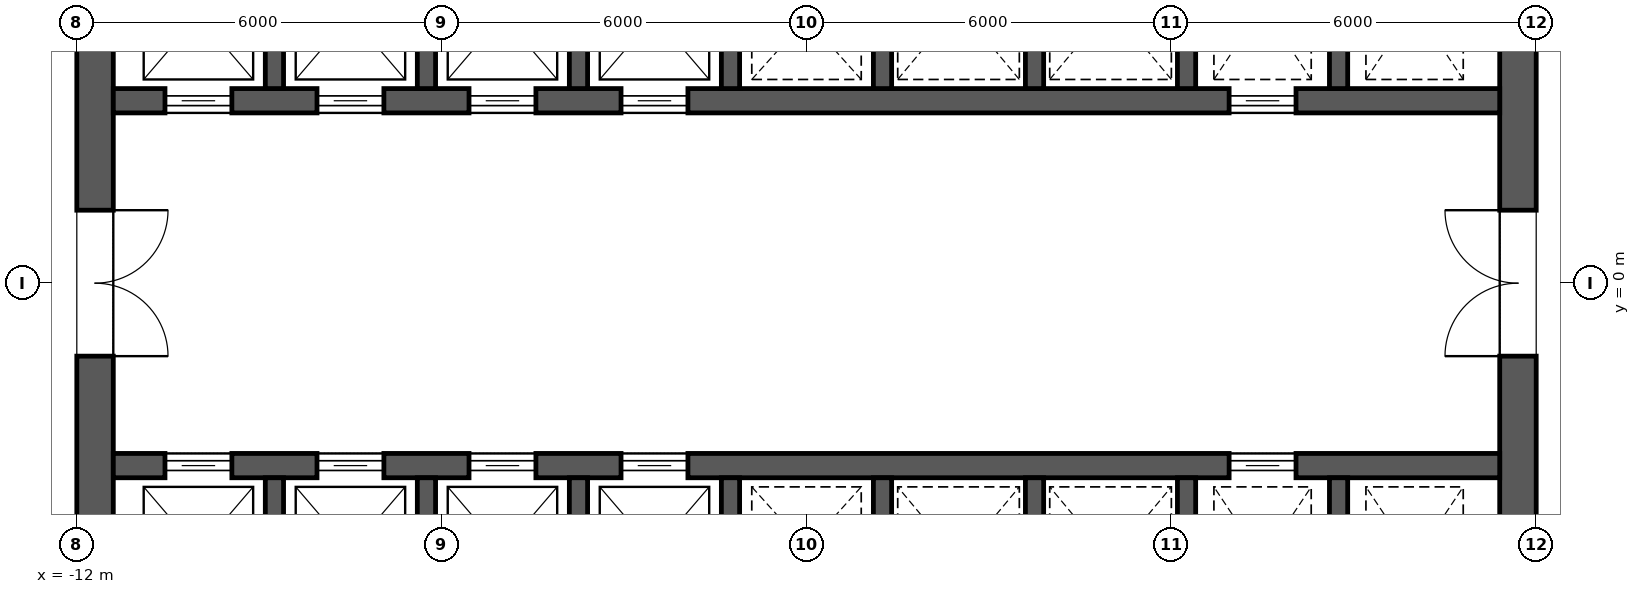
"""IFC4 building model, lengths in metres.
Left out: names, types, materials, properties, quantities, classifications, styles, units other than length and angle.
Written with IfcOpenShell. Run it as: python <this file> out.ifc"""

import sys

from ifc_helpers import new_model, si_unit, direction, frame, frame_2d, origin, place, context, subcontext, project, spatial, rectangle, extrude, element, fill, save


model = new_model("IFC4")
c1 = context("Model", 3, precision=1e-05, world=origin(), true_north=direction((0.0, 1.0)))
c2 = subcontext(c1, "Body", "Model", "MODEL_VIEW")
j1 = project(units=[si_unit("LENGTHUNIT", "METRE"), si_unit("PLANEANGLEUNIT", "RADIAN")], contexts=[c1])
p1 = place(None, origin())
s1 = spatial("IfcSite", under=j1, at=p1, CompositionType="ELEMENT")
p2 = place(p1, origin())
s2 = spatial("IfcBuilding", under=s1, at=p2, CompositionType="ELEMENT")
p3 = place(p2, frame((0.0, 0.0, 69.7)))
s3 = spatial("IfcBuildingStorey", under=s2, at=p3, CompositionType="ELEMENT", Elevation=69.7)
p4 = place(p3, frame((11.7, -11.4, 0.0), z_axis=(0.0, 0.0, 1.0), x_axis=(0.0, 1.0, 0.0)))
e1 = element("IfcWall", 1, at=p4, inside=s3, PredefinedType="SHEAR", context=c2, shape_type="SweptSolid", body=[
    extrude(rectangle(XDim=22.8, YDim=0.6, at=frame_2d((11.4, 0.0))), origin(), (0.0, 0.0, 1.0), 4.2),
])
p5 = place(p4, frame((10.2, 0.0, 0.0)))
e2 = element("IfcOpeningElement", 2, at=p5, cuts=e1, PredefinedType="OPENING", context=c2, shape_type="SweptSolid", body=[
    extrude(rectangle(XDim=2.4, YDim=2.1, at=frame_2d((1.2, 1.05))), frame((0.0, 0.312, 0.0), z_axis=(0.0, -1.0, 0.0), x_axis=(1.0, 0.0, 0.0)), (0.0, 0.0, 1.0), 0.624),
])
p6 = place(p4, frame((19.5, 0.0, 0.0)))
e3 = element("IfcOpeningElement", 3, at=p6, cuts=e1, PredefinedType="OPENING", context=c2, shape_type="SweptSolid", body=[
    extrude(rectangle(XDim=1.2, YDim=2.1, at=frame_2d((0.6, 1.05))), frame((0.0, 0.312, 0.0), z_axis=(0.0, -1.0, 0.0), x_axis=(1.0, 0.0, 0.0)), (0.0, 0.0, 1.0), 0.624),
])
p7 = place(p4, frame((2.1, 0.0, 0.0)))
e4 = element("IfcOpeningElement", 4, at=p7, cuts=e1, PredefinedType="OPENING", context=c2, shape_type="SweptSolid", body=[
    extrude(rectangle(XDim=1.2, YDim=2.1, at=frame_2d((0.6, 1.05))), frame((0.0, 0.312, 0.0), z_axis=(0.0, -1.0, 0.0), x_axis=(1.0, 0.0, 0.0)), (0.0, 0.0, 1.0), 0.624),
])
p8 = place(p3, frame((-11.7, -11.4, 0.0), z_axis=(0.0, 0.0, 1.0), x_axis=(0.0, 1.0, 0.0)))
e5 = element("IfcWall", 5, at=p8, inside=s3, PredefinedType="SHEAR", context=c2, shape_type="SweptSolid", body=[
    extrude(rectangle(XDim=22.8, YDim=0.6, at=frame_2d((11.4, 0.0))), origin(), (0.0, 0.0, 1.0), 4.2),
])
p9 = place(p8, frame((10.2, 0.0, 0.0)))
e6 = element("IfcOpeningElement", 6, at=p9, cuts=e5, PredefinedType="OPENING", context=c2, shape_type="SweptSolid", body=[
    extrude(rectangle(XDim=2.4, YDim=2.1, at=frame_2d((1.2, 1.05))), frame((0.0, 0.312, 0.0), z_axis=(0.0, -1.0, 0.0), x_axis=(1.0, 0.0, 0.0)), (0.0, 0.0, 1.0), 0.624),
])
p10 = place(p8, frame((18.925, 0.0, 0.0)))
e7 = element("IfcOpeningElement", 7, at=p10, cuts=e5, PredefinedType="OPENING", context=c2, shape_type="SweptSolid", body=[
    extrude(rectangle(XDim=1.2, YDim=2.1, at=frame_2d((0.6, 1.05))), frame((0.0, 0.312, 0.0), z_axis=(0.0, -1.0, 0.0), x_axis=(1.0, 0.0, 0.0)), (0.0, 0.0, 1.0), 0.624),
])
p11 = place(p8, frame((2.675, 0.0, 0.0)))
e8 = element("IfcOpeningElement", 8, at=p11, cuts=e5, PredefinedType="OPENING", context=c2, shape_type="SweptSolid", body=[
    extrude(rectangle(XDim=1.2, YDim=2.1, at=frame_2d((0.6, 1.05))), frame((0.0, 0.312, 0.0), z_axis=(0.0, -1.0, 0.0), x_axis=(1.0, 0.0, 0.0)), (0.0, 0.0, 1.0), 0.624),
])
p12 = place(p3, frame((-11.4, 3.0, 0.0), z_axis=(0.0, 0.0, 1.0), x_axis=(1.0, 0.0, 0.0)))
e9 = element("IfcWall", 9, at=p12, inside=s3, PredefinedType="SHEAR", context=c2, shape_type="SweptSolid", body=[
    extrude(rectangle(XDim=22.8, YDim=0.4, at=frame_2d((11.4, 0.0))), origin(), (0.0, 0.0, 1.0), 4.2),
])
p13 = place(p12, frame((0.85, 0.0, 0.0)))
e10 = element("IfcOpeningElement", 10, at=p13, cuts=e9, PredefinedType="OPENING", context=c2, shape_type="SweptSolid", body=[
    extrude(rectangle(XDim=1.1, YDim=2.1, at=frame_2d((0.55, 1.05))), frame((0.0, 0.212, 0.0), z_axis=(0.0, -1.0, 0.0), x_axis=(1.0, 0.0, 0.0)), (0.0, 0.0, 1.0), 0.424),
])
p14 = place(p12, frame((3.35, 0.0, 0.0)))
e11 = element("IfcOpeningElement", 11, at=p14, cuts=e9, PredefinedType="OPENING", context=c2, shape_type="SweptSolid", body=[
    extrude(rectangle(XDim=1.1, YDim=2.1, at=frame_2d((0.55, 1.05))), frame((0.0, 0.212, 0.0), z_axis=(0.0, -1.0, 0.0), x_axis=(1.0, 0.0, 0.0)), (0.0, 0.0, 1.0), 0.424),
])
p15 = place(p12, frame((5.85, 0.0, 0.0)))
e12 = element("IfcOpeningElement", 12, at=p15, cuts=e9, PredefinedType="OPENING", context=c2, shape_type="SweptSolid", body=[
    extrude(rectangle(XDim=1.1, YDim=2.1, at=frame_2d((0.55, 1.05))), frame((0.0, 0.212, 0.0), z_axis=(0.0, -1.0, 0.0), x_axis=(1.0, 0.0, 0.0)), (0.0, 0.0, 1.0), 0.424),
])
p16 = place(p12, frame((8.35, 0.0, 0.0)))
e13 = element("IfcOpeningElement", 13, at=p16, cuts=e9, PredefinedType="OPENING", context=c2, shape_type="SweptSolid", body=[
    extrude(rectangle(XDim=1.1, YDim=2.1, at=frame_2d((0.55, 1.05))), frame((0.0, 0.212, 0.0), z_axis=(0.0, -1.0, 0.0), x_axis=(1.0, 0.0, 0.0)), (0.0, 0.0, 1.0), 0.424),
])
p17 = place(p12, frame((18.35, 0.0, 0.0)))
e14 = element("IfcOpeningElement", 14, at=p17, cuts=e9, PredefinedType="OPENING", context=c2, shape_type="SweptSolid", body=[
    extrude(rectangle(XDim=1.1, YDim=2.1, at=frame_2d((0.55, 1.05))), frame((0.0, 0.212, 0.0), z_axis=(0.0, -1.0, 0.0), x_axis=(1.0, 0.0, 0.0)), (0.0, 0.0, 1.0), 0.424),
])
for number, where, z_axis, x_axis in (
    (15, (-8.75, 3.2, 0.0), (0.0, 0.0, 1.0), (0.0, 1.0, 0.0)),
    (16, (-6.25, 3.2, 0.0), (0.0, 0.0, 1.0), (0.0, 1.0, 0.0)),
    (17, (-3.75, 3.2, 0.0), (0.0, 0.0, 1.0), (0.0, 1.0, 0.0)),
    (18, (-1.25, 3.2, 0.0), (0.0, 0.0, 1.0), (0.0, 1.0, 0.0)),
    (19, (1.25, 3.2, 0.0), (0.0, 0.0, 1.0), (0.0, 1.0, 0.0)),
    (20, (3.75, 3.2, 0.0), (0.0, 0.0, 1.0), (0.0, 1.0, 0.0)),
    (21, (6.25, 3.2, 0.0), (0.0, 0.0, 1.0), (0.0, 1.0, 0.0)),
    (22, (8.75, 3.2, 0.0), (0.0, 0.0, 1.0), (0.0, 1.0, 0.0)),
):
    element("IfcWall", number, at=place(p3, frame(where, z_axis=z_axis, x_axis=x_axis)), inside=s3, PredefinedType="SHEAR", context=c2, shape_type="SweptSolid", body=[
        extrude(rectangle(XDim=2.9, YDim=0.3, at=frame_2d((1.45, 0.0))), origin(), (0.0, 0.0, 1.0), 4.2),
    ])
p18 = place(p3, frame((-11.4, -3.0, 0.0), z_axis=(0.0, 0.0, 1.0), x_axis=(1.0, 0.0, 0.0)))
e23 = element("IfcWall", 23, at=p18, inside=s3, PredefinedType="SHEAR", context=c2, shape_type="SweptSolid", body=[
    extrude(rectangle(XDim=22.8, YDim=0.4, at=frame_2d((11.4, 0.0))), origin(), (0.0, 0.0, 1.0), 4.2),
])
p19 = place(p18, frame((0.85, 0.0, 0.0)))
e24 = element("IfcOpeningElement", 24, at=p19, cuts=e23, PredefinedType="OPENING", context=c2, shape_type="SweptSolid", body=[
    extrude(rectangle(XDim=1.1, YDim=2.1, at=frame_2d((0.55, 1.05))), frame((0.0, 0.212, 0.0), z_axis=(0.0, -1.0, 0.0), x_axis=(1.0, 0.0, 0.0)), (0.0, 0.0, 1.0), 0.424),
])
p20 = place(p18, frame((3.35, 0.0, 0.0)))
e25 = element("IfcOpeningElement", 25, at=p20, cuts=e23, PredefinedType="OPENING", context=c2, shape_type="SweptSolid", body=[
    extrude(rectangle(XDim=1.1, YDim=2.1, at=frame_2d((0.55, 1.05))), frame((0.0, 0.212, 0.0), z_axis=(0.0, -1.0, 0.0), x_axis=(1.0, 0.0, 0.0)), (0.0, 0.0, 1.0), 0.424),
])
p21 = place(p18, frame((5.85, 0.0, 0.0)))
e26 = element("IfcOpeningElement", 26, at=p21, cuts=e23, PredefinedType="OPENING", context=c2, shape_type="SweptSolid", body=[
    extrude(rectangle(XDim=1.1, YDim=2.1, at=frame_2d((0.55, 1.05))), frame((0.0, 0.212, 0.0), z_axis=(0.0, -1.0, 0.0), x_axis=(1.0, 0.0, 0.0)), (0.0, 0.0, 1.0), 0.424),
])
p22 = place(p18, frame((8.35, 0.0, 0.0)))
e27 = element("IfcOpeningElement", 27, at=p22, cuts=e23, PredefinedType="OPENING", context=c2, shape_type="SweptSolid", body=[
    extrude(rectangle(XDim=1.1, YDim=2.1, at=frame_2d((0.55, 1.05))), frame((0.0, 0.212, 0.0), z_axis=(0.0, -1.0, 0.0), x_axis=(1.0, 0.0, 0.0)), (0.0, 0.0, 1.0), 0.424),
])
p23 = place(p18, frame((18.35, 0.0, 0.0)))
e28 = element("IfcOpeningElement", 28, at=p23, cuts=e23, PredefinedType="OPENING", context=c2, shape_type="SweptSolid", body=[
    extrude(rectangle(XDim=1.1, YDim=2.1, at=frame_2d((0.55, 1.05))), frame((0.0, 0.212, 0.0), z_axis=(0.0, -1.0, 0.0), x_axis=(1.0, 0.0, 0.0)), (0.0, 0.0, 1.0), 0.424),
])
for number, where, z_axis, x_axis in (
    (29, (-8.75, -6.1, 0.0), (0.0, 0.0, 1.0), (0.0, 1.0, 0.0)),
    (30, (-6.25, -6.1, 0.0), (0.0, 0.0, 1.0), (0.0, 1.0, 0.0)),
    (31, (-3.75, -6.1, 0.0), (0.0, 0.0, 1.0), (0.0, 1.0, 0.0)),
    (32, (-1.25, -6.1, 0.0), (0.0, 0.0, 1.0), (0.0, 1.0, 0.0)),
    (33, (1.25, -6.1, 0.0), (0.0, 0.0, 1.0), (0.0, 1.0, 0.0)),
    (34, (3.75, -6.1, 0.0), (0.0, 0.0, 1.0), (0.0, 1.0, 0.0)),
    (35, (6.25, -6.1, 0.0), (0.0, 0.0, 1.0), (0.0, 1.0, 0.0)),
    (36, (8.75, -6.1, 0.0), (0.0, 0.0, 1.0), (0.0, 1.0, 0.0)),
):
    element("IfcWall", number, at=place(p3, frame(where, z_axis=z_axis, x_axis=x_axis)), inside=s3, PredefinedType="SHEAR", context=c2, shape_type="SweptSolid", body=[
        extrude(rectangle(XDim=2.9, YDim=0.3, at=frame_2d((1.45, 0.0))), origin(), (0.0, 0.0, 1.0), 4.2),
    ])
p24 = place(p13, origin())
e37 = element("IfcDoor", 37, at=p24, inside=s3, OperationType="SLIDING_TO_LEFT", PredefinedType="DOOR", context=c2, shape_type="SweptSolid", body=[
    extrude(rectangle(XDim=1.1, YDim=2.1, at=frame_2d((0.55, 1.05))), frame((0.0, 0.025, 0.0), z_axis=(0.0, -1.0, 0.0), x_axis=(1.0, 0.0, 0.0)), (0.0, 0.0, 1.0), 0.05),
])
fill(e10, e37)
p25 = place(p14, origin())
e38 = element("IfcDoor", 38, at=p25, inside=s3, OperationType="SLIDING_TO_LEFT", PredefinedType="DOOR", context=c2, shape_type="SweptSolid", body=[
    extrude(rectangle(XDim=1.1, YDim=2.1, at=frame_2d((0.55, 1.05))), frame((0.0, 0.025, 0.0), z_axis=(0.0, -1.0, 0.0), x_axis=(1.0, 0.0, 0.0)), (0.0, 0.0, 1.0), 0.05),
])
fill(e11, e38)
p26 = place(p15, origin())
e39 = element("IfcDoor", 39, at=p26, inside=s3, OperationType="SLIDING_TO_LEFT", PredefinedType="DOOR", context=c2, shape_type="SweptSolid", body=[
    extrude(rectangle(XDim=1.1, YDim=2.1, at=frame_2d((0.55, 1.05))), frame((0.0, 0.025, 0.0), z_axis=(0.0, -1.0, 0.0), x_axis=(1.0, 0.0, 0.0)), (0.0, 0.0, 1.0), 0.05),
])
fill(e12, e39)
p27 = place(p16, origin())
e40 = element("IfcDoor", 40, at=p27, inside=s3, OperationType="SLIDING_TO_LEFT", PredefinedType="DOOR", context=c2, shape_type="SweptSolid", body=[
    extrude(rectangle(XDim=1.1, YDim=2.1, at=frame_2d((0.55, 1.05))), frame((0.0, 0.025, 0.0), z_axis=(0.0, -1.0, 0.0), x_axis=(1.0, 0.0, 0.0)), (0.0, 0.0, 1.0), 0.05),
])
fill(e13, e40)
p28 = place(p19, origin())
e41 = element("IfcDoor", 41, at=p28, inside=s3, OperationType="SLIDING_TO_LEFT", PredefinedType="DOOR", context=c2, shape_type="SweptSolid", body=[
    extrude(rectangle(XDim=1.1, YDim=2.1, at=frame_2d((0.55, 1.05))), frame((0.0, 0.025, 0.0), z_axis=(0.0, -1.0, 0.0), x_axis=(1.0, 0.0, 0.0)), (0.0, 0.0, 1.0), 0.05),
])
fill(e24, e41)
p29 = place(p20, origin())
e42 = element("IfcDoor", 42, at=p29, inside=s3, OperationType="SLIDING_TO_LEFT", PredefinedType="DOOR", context=c2, shape_type="SweptSolid", body=[
    extrude(rectangle(XDim=1.1, YDim=2.1, at=frame_2d((0.55, 1.05))), frame((0.0, 0.025, 0.0), z_axis=(0.0, -1.0, 0.0), x_axis=(1.0, 0.0, 0.0)), (0.0, 0.0, 1.0), 0.05),
])
fill(e25, e42)
p30 = place(p21, origin())
e43 = element("IfcDoor", 43, at=p30, inside=s3, OperationType="SLIDING_TO_LEFT", PredefinedType="DOOR", context=c2, shape_type="SweptSolid", body=[
    extrude(rectangle(XDim=1.1, YDim=2.1, at=frame_2d((0.55, 1.05))), frame((0.0, 0.025, 0.0), z_axis=(0.0, -1.0, 0.0), x_axis=(1.0, 0.0, 0.0)), (0.0, 0.0, 1.0), 0.05),
])
fill(e26, e43)
p31 = place(p22, origin())
e44 = element("IfcDoor", 44, at=p31, inside=s3, OperationType="SLIDING_TO_LEFT", PredefinedType="DOOR", context=c2, shape_type="SweptSolid", body=[
    extrude(rectangle(XDim=1.1, YDim=2.1, at=frame_2d((0.55, 1.05))), frame((0.0, 0.025, 0.0), z_axis=(0.0, -1.0, 0.0), x_axis=(1.0, 0.0, 0.0)), (0.0, 0.0, 1.0), 0.05),
])
fill(e27, e44)
p32 = place(p17, origin())
e45 = element("IfcDoor", 45, at=p32, inside=s3, OperationType="SLIDING_TO_LEFT", PredefinedType="DOOR", context=c2, shape_type="SweptSolid", body=[
    extrude(rectangle(XDim=1.1, YDim=2.1, at=frame_2d((0.55, 1.05))), frame((0.0, 0.025, 0.0), z_axis=(0.0, -1.0, 0.0), x_axis=(1.0, 0.0, 0.0)), (0.0, 0.0, 1.0), 0.05),
])
fill(e14, e45)
p33 = place(p23, origin())
e46 = element("IfcDoor", 46, at=p33, inside=s3, OperationType="SLIDING_TO_LEFT", PredefinedType="DOOR", context=c2, shape_type="SweptSolid", body=[
    extrude(rectangle(XDim=1.1, YDim=2.1, at=frame_2d((0.55, 1.05))), frame((0.0, 0.025, 0.0), z_axis=(0.0, -1.0, 0.0), x_axis=(1.0, 0.0, 0.0)), (0.0, 0.0, 1.0), 0.05),
])
fill(e28, e46)
p34 = place(p9, frame((2.4, 0.0, 0.0), z_axis=(0.0, 0.0, 1.0), x_axis=(-1.0, 0.0, 0.0)))
e47 = element("IfcDoor", 47, at=p34, inside=s3, OperationType="DOUBLE_DOOR_SINGLE_SWING", PredefinedType="DOOR", context=c2, shape_type="SweptSolid", body=[
    extrude(rectangle(XDim=2.4, YDim=2.1, at=frame_2d((1.2, 1.05))), frame((0.0, 0.025, 0.0), z_axis=(0.0, -1.0, 0.0), x_axis=(1.0, 0.0, 0.0)), (0.0, 0.0, 1.0), 0.05),
])
fill(e6, e47)
p35 = place(p5, origin())
e48 = element("IfcDoor", 48, at=p35, inside=s3, OperationType="DOUBLE_DOOR_SINGLE_SWING", PredefinedType="DOOR", context=c2, shape_type="SweptSolid", body=[
    extrude(rectangle(XDim=2.4, YDim=2.1, at=frame_2d((1.2, 1.05))), frame((0.0, 0.025, 0.0), z_axis=(0.0, -1.0, 0.0), x_axis=(1.0, 0.0, 0.0)), (0.0, 0.0, 1.0), 0.05),
])
fill(e2, e48)
save(model, sys.argv[1])
